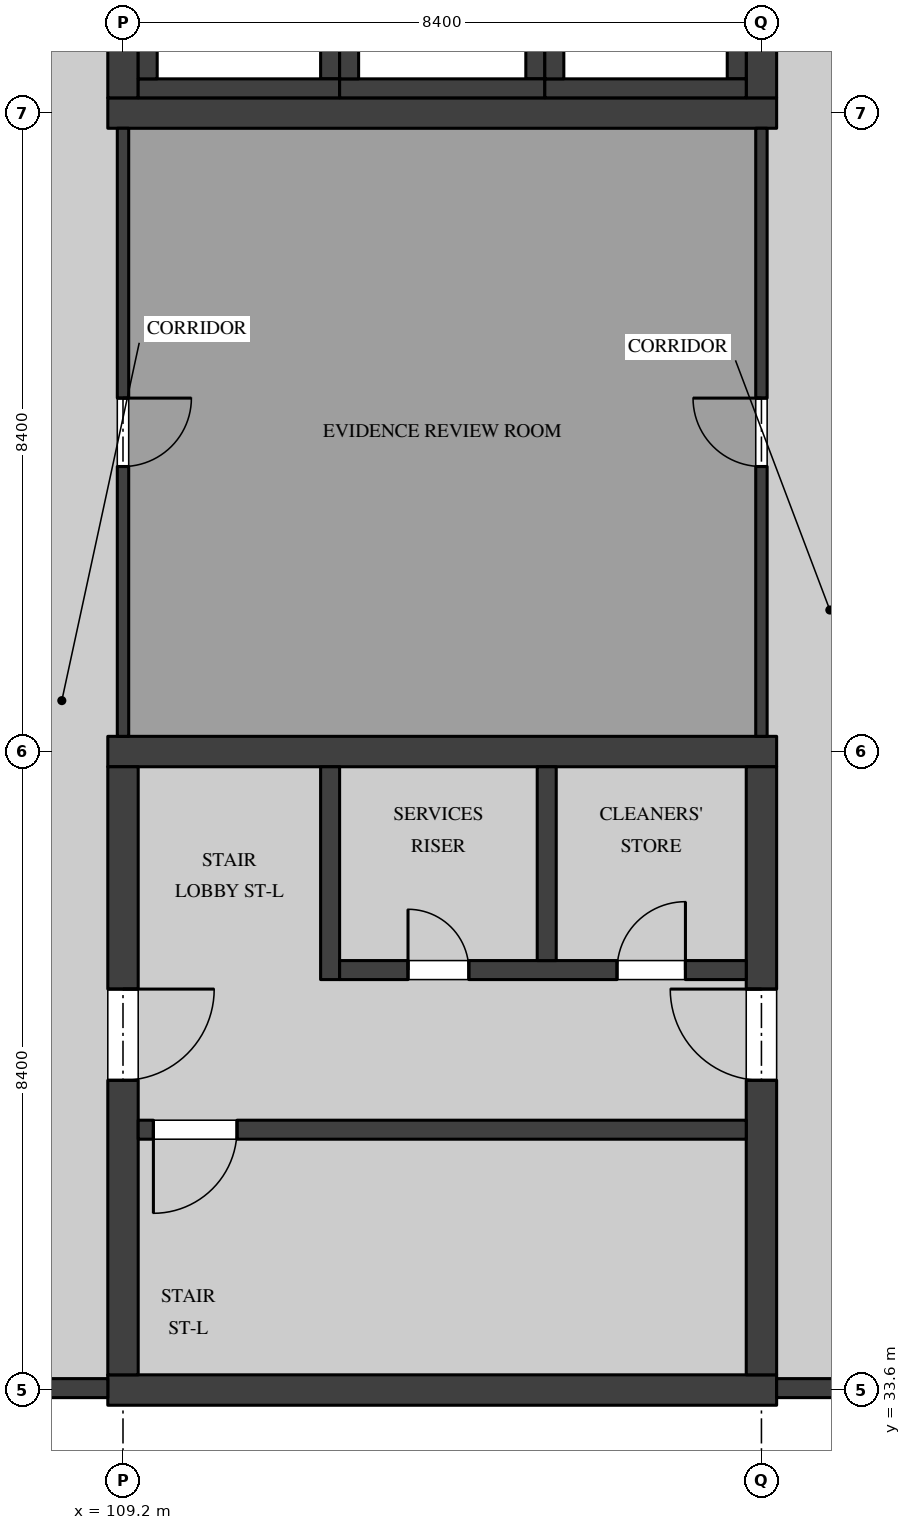
"""IFC4 building model, lengths in metres.
Left out: names, types, materials, properties, quantities, classifications, styles, units other than length and angle.
Written with IfcOpenShell. Run it as: python <this file> out.ifc"""

import sys

from ifc_helpers import new_model, si_unit, direction, frame, frame_2d, origin, place, context, subcontext, project, spatial, rectangle, extrude, element, fill, save


model = new_model("IFC4")
c1 = context("Model", 3, precision=1e-05, world=origin(), true_north=direction((0.0, 1.0)))
c2 = subcontext(c1, "Body", "Model", "MODEL_VIEW")
j1 = project(units=[si_unit("LENGTHUNIT", "METRE"), si_unit("PLANEANGLEUNIT", "RADIAN")], contexts=[c1])
p1 = place(None, origin())
s1 = spatial("IfcSite", under=j1, at=p1, CompositionType="ELEMENT")
p2 = place(p1, origin())
s2 = spatial("IfcBuilding", under=s1, at=p2, CompositionType="ELEMENT")
p3 = place(p2, frame((0.0, 0.0, 23.4)))
s3 = spatial("IfcBuildingStorey", under=s2, at=p3, CompositionType="ELEMENT", Elevation=23.4)
p4 = place(p3, frame((109.0, 50.4, 0.0), z_axis=(0.0, 0.0, 1.0), x_axis=(1.0, 0.0, 0.0)))
e1 = element("IfcWall", 1, at=p4, inside=s3, PredefinedType="SHEAR", context=c2, shape_type="SweptSolid", body=[
    extrude(rectangle(XDim=8.8, YDim=0.4, at=frame_2d((4.4, 0.0))), origin(), (0.0, 0.0, 1.0), 4.37),
])
p5 = place(p3, frame((109.2, 50.6, 0.0), z_axis=(0.0, 0.0, 1.0), x_axis=(0.0, 1.0, 0.0)))
e2 = element("IfcWall", 2, at=p5, inside=s3, PredefinedType="SHEAR", context=c2, shape_type="SweptSolid", body=[
    extrude(rectangle(XDim=8.0, YDim=0.4, at=frame_2d((4.0, 0.0))), origin(), (0.0, 0.0, 1.0), 4.37),
])
p6 = place(p5, frame((3.25, 0.0, 0.0)))
e3 = element("IfcOpeningElement", 3, at=p6, cuts=e2, PredefinedType="OPENING", context=c2, shape_type="SweptSolid", body=[
    extrude(rectangle(XDim=1.2, YDim=2.1, at=frame_2d((0.6, 1.05))), frame((0.0, 0.21, 0.0), z_axis=(0.0, -1.0, 0.0), x_axis=(1.0, 0.0, 0.0)), (0.0, 0.0, 1.0), 0.42),
])
p7 = place(p3, frame((117.6, 50.6, 0.0), z_axis=(0.0, 0.0, 1.0), x_axis=(0.0, 1.0, 0.0)))
e4 = element("IfcWall", 4, at=p7, inside=s3, PredefinedType="SHEAR", context=c2, shape_type="SweptSolid", body=[
    extrude(rectangle(XDim=8.0, YDim=0.4, at=frame_2d((4.0, 0.0))), origin(), (0.0, 0.0, 1.0), 4.37),
])
p8 = place(p7, frame((3.25, 0.0, 0.0)))
e5 = element("IfcOpeningElement", 5, at=p8, cuts=e4, PredefinedType="OPENING", context=c2, shape_type="SweptSolid", body=[
    extrude(rectangle(XDim=1.2, YDim=2.1, at=frame_2d((0.6, 1.05))), frame((0.0, 0.21, 0.0), z_axis=(0.0, -1.0, 0.0), x_axis=(1.0, 0.0, 0.0)), (0.0, 0.0, 1.0), 0.42),
])
p9 = place(p7, frame((6.0, 0.0, 0.0)))
e6 = element("IfcOpeningElement", 6, at=p9, cuts=e4, PredefinedType="OPENING", context=c2, shape_type="SweptSolid", body=[
    extrude(rectangle(XDim=1.2, YDim=2.1, at=frame_2d((0.6, 1.05))), frame((0.0, 0.21, 0.0), z_axis=(0.0, -1.0, 0.0), x_axis=(1.0, 0.0, 0.0)), (0.0, 0.0, 1.0), 0.42),
])
for number, where, z_axis, x_axis in (
    (7, (109.0, 33.6, 0.0), (0.0, 0.0, 1.0), (1.0, 0.0, 0.0)),
    (8, (109.0, 42.0, 0.0), (0.0, 0.0, 1.0), (1.0, 0.0, 0.0)),
):
    element("IfcWall", number, at=place(p3, frame(where, z_axis=z_axis, x_axis=x_axis)), inside=s3, PredefinedType="SHEAR", context=c2, shape_type="SweptSolid", body=[
        extrude(rectangle(XDim=8.8, YDim=0.4, at=frame_2d((4.4, 0.0))), origin(), (0.0, 0.0, 1.0), 4.37),
    ])
p10 = place(p3, frame((109.2, 33.8, 0.0), z_axis=(0.0, 0.0, 1.0), x_axis=(0.0, 1.0, 0.0)))
e9 = element("IfcWall", 9, at=p10, inside=s3, PredefinedType="SHEAR", context=c2, shape_type="SweptSolid", body=[
    extrude(rectangle(XDim=8.0, YDim=0.4, at=frame_2d((4.0, 0.0))), origin(), (0.0, 0.0, 1.0), 4.37),
])
p11 = place(p10, frame((3.875, 0.0, 0.0)))
e10 = element("IfcOpeningElement", 10, at=p11, cuts=e9, PredefinedType="OPENING", context=c2, shape_type="SweptSolid", body=[
    extrude(rectangle(XDim=1.2, YDim=2.1, at=frame_2d((0.6, 1.05))), frame((0.0, 0.21, 0.0), z_axis=(0.0, -1.0, 0.0), x_axis=(1.0, 0.0, 0.0)), (0.0, 0.0, 1.0), 0.42),
])
p12 = place(p3, frame((117.6, 33.8, 0.0), z_axis=(0.0, 0.0, 1.0), x_axis=(0.0, 1.0, 0.0)))
e11 = element("IfcWall", 11, at=p12, inside=s3, PredefinedType="SHEAR", context=c2, shape_type="SweptSolid", body=[
    extrude(rectangle(XDim=8.0, YDim=0.4, at=frame_2d((4.0, 0.0))), origin(), (0.0, 0.0, 1.0), 4.37),
])
p13 = place(p12, frame((3.875, 0.0, 0.0)))
e12 = element("IfcOpeningElement", 12, at=p13, cuts=e11, PredefinedType="OPENING", context=c2, shape_type="SweptSolid", body=[
    extrude(rectangle(XDim=1.2, YDim=2.1, at=frame_2d((0.6, 1.05))), frame((0.0, 0.21, 0.0), z_axis=(0.0, -1.0, 0.0), x_axis=(1.0, 0.0, 0.0)), (0.0, 0.0, 1.0), 0.42),
])
p14 = place(p3, frame((109.4, 37.025, 0.0), z_axis=(0.0, 0.0, 1.0), x_axis=(1.0, 0.0, 0.0)))
e13 = element("IfcWall", 13, at=p14, inside=s3, PredefinedType="SOLIDWALL", context=c2, shape_type="SweptSolid", body=[
    extrude(rectangle(XDim=8.0, YDim=0.25, at=frame_2d((4.0, 0.0))), origin(), (0.0, 0.0, 1.0), 4.37),
])
p15 = place(p14, frame((0.2, 0.0, 0.0)))
e14 = element("IfcOpeningElement", 14, at=p15, cuts=e13, PredefinedType="OPENING", context=c2, shape_type="SweptSolid", body=[
    extrude(rectangle(XDim=1.1, YDim=2.1, at=frame_2d((0.55, 1.05))), frame((0.0, 0.135, 0.0), z_axis=(0.0, -1.0, 0.0), x_axis=(1.0, 0.0, 0.0)), (0.0, 0.0, 1.0), 0.27),
])
p16 = place(p3, frame((111.925, 39.0, 0.0), z_axis=(0.0, 0.0, 1.0), x_axis=(0.0, 1.0, 0.0)))
e15 = element("IfcWall", 15, at=p16, inside=s3, PredefinedType="SOLIDWALL", context=c2, shape_type="SweptSolid", body=[
    extrude(rectangle(XDim=2.8, YDim=0.25, at=frame_2d((1.4, 0.0))), origin(), (0.0, 0.0, 1.0), 4.37),
])
p17 = place(p3, frame((112.05, 39.125, 0.0), z_axis=(0.0, 0.0, 1.0), x_axis=(1.0, 0.0, 0.0)))
e16 = element("IfcWall", 16, at=p17, inside=s3, PredefinedType="SOLIDWALL", context=c2, shape_type="SweptSolid", body=[
    extrude(rectangle(XDim=5.35, YDim=0.25, at=frame_2d((2.675, 0.0))), origin(), (0.0, 0.0, 1.0), 4.37),
])
p18 = place(p17, frame((3.65, 0.0, 0.0)))
e17 = element("IfcOpeningElement", 17, at=p18, cuts=e16, PredefinedType="OPENING", context=c2, shape_type="SweptSolid", body=[
    extrude(rectangle(XDim=0.9, YDim=2.1, at=frame_2d((0.45, 1.05))), frame((0.0, 0.135, 0.0), z_axis=(0.0, -1.0, 0.0), x_axis=(1.0, 0.0, 0.0)), (0.0, 0.0, 1.0), 0.27),
])
p19 = place(p17, frame((0.9, 0.0, 0.0)))
e18 = element("IfcOpeningElement", 18, at=p19, cuts=e16, PredefinedType="OPENING", context=c2, shape_type="SweptSolid", body=[
    extrude(rectangle(XDim=0.8, YDim=2.1, at=frame_2d((0.4, 1.05))), frame((0.0, 0.135, 0.0), z_axis=(0.0, -1.0, 0.0), x_axis=(1.0, 0.0, 0.0)), (0.0, 0.0, 1.0), 0.27),
])
p20 = place(p3, frame((114.775, 39.25, 0.0), z_axis=(0.0, 0.0, 1.0), x_axis=(0.0, 1.0, 0.0)))
e19 = element("IfcWall", 19, at=p20, inside=s3, PredefinedType="SOLIDWALL", context=c2, shape_type="SweptSolid", body=[
    extrude(rectangle(XDim=2.55, YDim=0.25, at=frame_2d((1.275, 0.0))), origin(), (0.0, 0.0, 1.0), 4.37),
])
p21 = place(p3, frame((111.925, 50.85, 0.0), z_axis=(0.0, 0.0, 1.0), x_axis=(0.0, 1.0, 0.0)))
e20 = element("IfcWall", 20, at=p21, inside=s3, PredefinedType="SOLIDWALL", context=c2, shape_type="SweptSolid", body=[
    extrude(rectangle(XDim=2.3, YDim=0.25, at=frame_2d((1.15, 0.0))), origin(), (0.0, 0.0, 1.0), 4.37),
])
p22 = place(p3, frame((109.4, 50.725, 0.0), z_axis=(0.0, 0.0, 1.0), x_axis=(1.0, 0.0, 0.0)))
e21 = element("IfcWall", 21, at=p22, inside=s3, PredefinedType="SOLIDWALL", context=c2, shape_type="SweptSolid", body=[
    extrude(rectangle(XDim=2.65, YDim=0.25, at=frame_2d((1.325, 0.0))), origin(), (0.0, 0.0, 1.0), 4.37),
])
for number, where, z_axis, x_axis in (
    (22, (109.525, 50.85, 0.0), (0.0, 0.0, 1.0), (0.0, 1.0, 0.0)),
    (23, (114.625, 50.85, 0.0), (0.0, 0.0, 1.0), (0.0, 1.0, 0.0)),
):
    element("IfcWall", number, at=place(p3, frame(where, z_axis=z_axis, x_axis=x_axis)), inside=s3, PredefinedType="SOLIDWALL", context=c2, shape_type="SweptSolid", body=[
        extrude(rectangle(XDim=2.3, YDim=0.25, at=frame_2d((1.15, 0.0))), origin(), (0.0, 0.0, 1.0), 4.37),
    ])
p23 = place(p3, frame((112.05, 50.725, 0.0), z_axis=(0.0, 0.0, 1.0), x_axis=(1.0, 0.0, 0.0)))
e24 = element("IfcWall", 24, at=p23, inside=s3, PredefinedType="SOLIDWALL", context=c2, shape_type="SweptSolid", body=[
    extrude(rectangle(XDim=2.7, YDim=0.25, at=frame_2d((1.35, 0.0))), origin(), (0.0, 0.0, 1.0), 4.37),
])
for number, where, z_axis, x_axis in (
    (25, (112.175, 50.85, 0.0), (0.0, 0.0, 1.0), (0.0, 1.0, 0.0)),
    (26, (117.275, 50.85, 0.0), (0.0, 0.0, 1.0), (0.0, 1.0, 0.0)),
):
    element("IfcWall", number, at=place(p3, frame(where, z_axis=z_axis, x_axis=x_axis)), inside=s3, PredefinedType="SOLIDWALL", context=c2, shape_type="SweptSolid", body=[
        extrude(rectangle(XDim=2.3, YDim=0.25, at=frame_2d((1.15, 0.0))), origin(), (0.0, 0.0, 1.0), 4.37),
    ])
p24 = place(p3, frame((114.75, 50.725, 0.0), z_axis=(0.0, 0.0, 1.0), x_axis=(1.0, 0.0, 0.0)))
e27 = element("IfcWall", 27, at=p24, inside=s3, PredefinedType="SOLIDWALL", context=c2, shape_type="SweptSolid", body=[
    extrude(rectangle(XDim=2.65, YDim=0.25, at=frame_2d((1.325, 0.0))), origin(), (0.0, 0.0, 1.0), 4.37),
])
p25 = place(p3, frame((114.875, 50.85, 0.0), z_axis=(0.0, 0.0, 1.0), x_axis=(0.0, 1.0, 0.0)))
e28 = element("IfcWall", 28, at=p25, inside=s3, PredefinedType="SOLIDWALL", context=c2, shape_type="SweptSolid", body=[
    extrude(rectangle(XDim=2.3, YDim=0.25, at=frame_2d((1.15, 0.0))), origin(), (0.0, 0.0, 1.0), 4.37),
])
p26 = place(p3, frame((117.6, 42.2, 0.0), z_axis=(0.0, 0.0, 1.0), x_axis=(0.0, 1.0, 0.0)))
e29 = element("IfcWall", 29, at=p26, inside=s3, PredefinedType="PARTITIONING", context=c2, shape_type="SweptSolid", body=[
    extrude(rectangle(XDim=8.0, YDim=0.15, at=frame_2d((4.0, 0.0))), origin(), (0.0, 0.0, 1.0), 3.746),
])
p27 = place(p26, frame((3.55, 0.0, 0.0)))
e30 = element("IfcOpeningElement", 30, at=p27, cuts=e29, PredefinedType="OPENING", context=c2, shape_type="SweptSolid", body=[
    extrude(rectangle(XDim=0.9, YDim=2.1, at=frame_2d((0.45, 1.05))), frame((0.0, 0.085, 0.0), z_axis=(0.0, -1.0, 0.0), x_axis=(1.0, 0.0, 0.0)), (0.0, 0.0, 1.0), 0.17),
])
p28 = place(p3, frame((109.2, 42.2, 0.0), z_axis=(0.0, 0.0, 1.0), x_axis=(0.0, 1.0, 0.0)))
e31 = element("IfcWall", 31, at=p28, inside=s3, PredefinedType="PARTITIONING", context=c2, shape_type="SweptSolid", body=[
    extrude(rectangle(XDim=8.0, YDim=0.15, at=frame_2d((4.0, 0.0))), origin(), (0.0, 0.0, 1.0), 3.746),
])
p29 = place(p28, frame((3.55, 0.0, 0.0)))
e32 = element("IfcOpeningElement", 32, at=p29, cuts=e31, PredefinedType="OPENING", context=c2, shape_type="SweptSolid", body=[
    extrude(rectangle(XDim=0.9, YDim=2.1, at=frame_2d((0.45, 1.05))), frame((0.0, 0.085, 0.0), z_axis=(0.0, -1.0, 0.0), x_axis=(1.0, 0.0, 0.0)), (0.0, 0.0, 1.0), 0.17),
])
p30 = place(p3, frame((100.803, 33.625, 0.0), z_axis=(0.0, 0.0, 1.0), x_axis=(1.0, 0.0, 0.0)))
e33 = element("IfcWall", 33, at=p30, inside=s3, PredefinedType="SOLIDWALL", context=c2, shape_type="SweptSolid", body=[
    extrude(rectangle(XDim=8.197, YDim=0.25, at=frame_2d((4.098, 0.0))), origin(), (0.0, 0.0, 1.0), 3.746),
])
p31 = place(p30, frame((0.896, 0.0, 0.9)))
e34 = element("IfcOpeningElement", 34, at=p31, cuts=e33, PredefinedType="OPENING", context=c2, shape_type="SweptSolid", body=[
    extrude(rectangle(XDim=2.4, YDim=1.95, at=frame_2d((1.2, 0.975))), frame((0.0, 0.135, 0.0), z_axis=(0.0, -1.0, 0.0), x_axis=(1.0, 0.0, 0.0)), (0.0, 0.0, 1.0), 0.27),
])
p32 = place(p3, frame((117.8, 33.625, 0.0), z_axis=(0.0, 0.0, 1.0), x_axis=(1.0, 0.0, 0.0)))
e35 = element("IfcWall", 35, at=p32, inside=s3, PredefinedType="SOLIDWALL", context=c2, shape_type="SweptSolid", body=[
    extrude(rectangle(XDim=8.199, YDim=0.25, at=frame_2d((4.099, 0.0))), origin(), (0.0, 0.0, 1.0), 3.746),
])
p33 = place(p32, frame((5.2, 0.0, 0.9)))
e36 = element("IfcOpeningElement", 36, at=p33, cuts=e35, PredefinedType="OPENING", context=c2, shape_type="SweptSolid", body=[
    extrude(rectangle(XDim=1.8, YDim=1.95, at=frame_2d((0.9, 0.975))), frame((0.0, 0.135, 0.0), z_axis=(0.0, -1.0, 0.0), x_axis=(1.0, 0.0, 0.0)), (0.0, 0.0, 1.0), 0.27),
])
p34 = place(p18, origin())
e37 = element("IfcDoor", 37, at=p34, inside=s3, OperationType="SINGLE_SWING_LEFT", PredefinedType="DOOR", context=c2, shape_type="SweptSolid", body=[
    extrude(rectangle(XDim=0.9, YDim=2.1, at=frame_2d((0.45, 1.05))), frame((0.0, 0.035, 0.0), z_axis=(0.0, -1.0, 0.0), x_axis=(1.0, 0.0, 0.0)), (0.0, 0.0, 1.0), 0.07),
])
fill(e17, e37)
p35 = place(p11, frame((1.2, 0.0, 0.0), z_axis=(0.0, 0.0, 1.0), x_axis=(-1.0, 0.0, 0.0)))
e38 = element("IfcDoor", 38, at=p35, inside=s3, OperationType="SINGLE_SWING_RIGHT", PredefinedType="DOOR", context=c2, shape_type="SweptSolid", body=[
    extrude(rectangle(XDim=1.2, YDim=2.1, at=frame_2d((0.6, 1.05))), frame((0.0, 0.035, 0.0), z_axis=(0.0, -1.0, 0.0), x_axis=(1.0, 0.0, 0.0)), (0.0, 0.0, 1.0), 0.07),
])
fill(e10, e38)
p36 = place(p13, origin())
e39 = element("IfcDoor", 39, at=p36, inside=s3, OperationType="SINGLE_SWING_LEFT", PredefinedType="DOOR", context=c2, shape_type="SweptSolid", body=[
    extrude(rectangle(XDim=1.2, YDim=2.1, at=frame_2d((0.6, 1.05))), frame((0.0, 0.035, 0.0), z_axis=(0.0, -1.0, 0.0), x_axis=(1.0, 0.0, 0.0)), (0.0, 0.0, 1.0), 0.07),
])
fill(e12, e39)
p37 = place(p19, origin())
e40 = element("IfcDoor", 40, at=p37, inside=s3, OperationType="SINGLE_SWING_RIGHT", PredefinedType="DOOR", context=c2, shape_type="SweptSolid", body=[
    extrude(rectangle(XDim=0.8, YDim=2.1, at=frame_2d((0.4, 1.05))), frame((0.0, 0.035, 0.0), z_axis=(0.0, -1.0, 0.0), x_axis=(1.0, 0.0, 0.0)), (0.0, 0.0, 1.0), 0.07),
])
fill(e18, e40)
p38 = place(p15, frame((1.1, 0.0, 0.0), z_axis=(0.0, 0.0, 1.0), x_axis=(-1.0, 0.0, 0.0)))
e41 = element("IfcDoor", 41, at=p38, inside=s3, OperationType="SINGLE_SWING_LEFT", PredefinedType="DOOR", context=c2, shape_type="SweptSolid", body=[
    extrude(rectangle(XDim=1.1, YDim=2.1, at=frame_2d((0.55, 1.05))), frame((0.0, 0.035, 0.0), z_axis=(0.0, -1.0, 0.0), x_axis=(1.0, 0.0, 0.0)), (0.0, 0.0, 1.0), 0.07),
])
fill(e14, e41)
p39 = place(p27, origin())
e42 = element("IfcDoor", 42, at=p39, inside=s3, OperationType="SINGLE_SWING_LEFT", PredefinedType="DOOR", context=c2, shape_type="SweptSolid", body=[
    extrude(rectangle(XDim=0.9, YDim=2.1, at=frame_2d((0.45, 1.05))), frame((0.0, 0.025, 0.0), z_axis=(0.0, -1.0, 0.0), x_axis=(1.0, 0.0, 0.0)), (0.0, 0.0, 1.0), 0.05),
])
fill(e30, e42)
p40 = place(p29, frame((0.9, 0.0, 0.0), z_axis=(0.0, 0.0, 1.0), x_axis=(-1.0, 0.0, 0.0)))
e43 = element("IfcDoor", 43, at=p40, inside=s3, OperationType="SINGLE_SWING_RIGHT", PredefinedType="DOOR", context=c2, shape_type="SweptSolid", body=[
    extrude(rectangle(XDim=0.9, YDim=2.1, at=frame_2d((0.45, 1.05))), frame((0.0, 0.025, 0.0), z_axis=(0.0, -1.0, 0.0), x_axis=(1.0, 0.0, 0.0)), (0.0, 0.0, 1.0), 0.05),
])
fill(e32, e43)
save(model, sys.argv[1])
